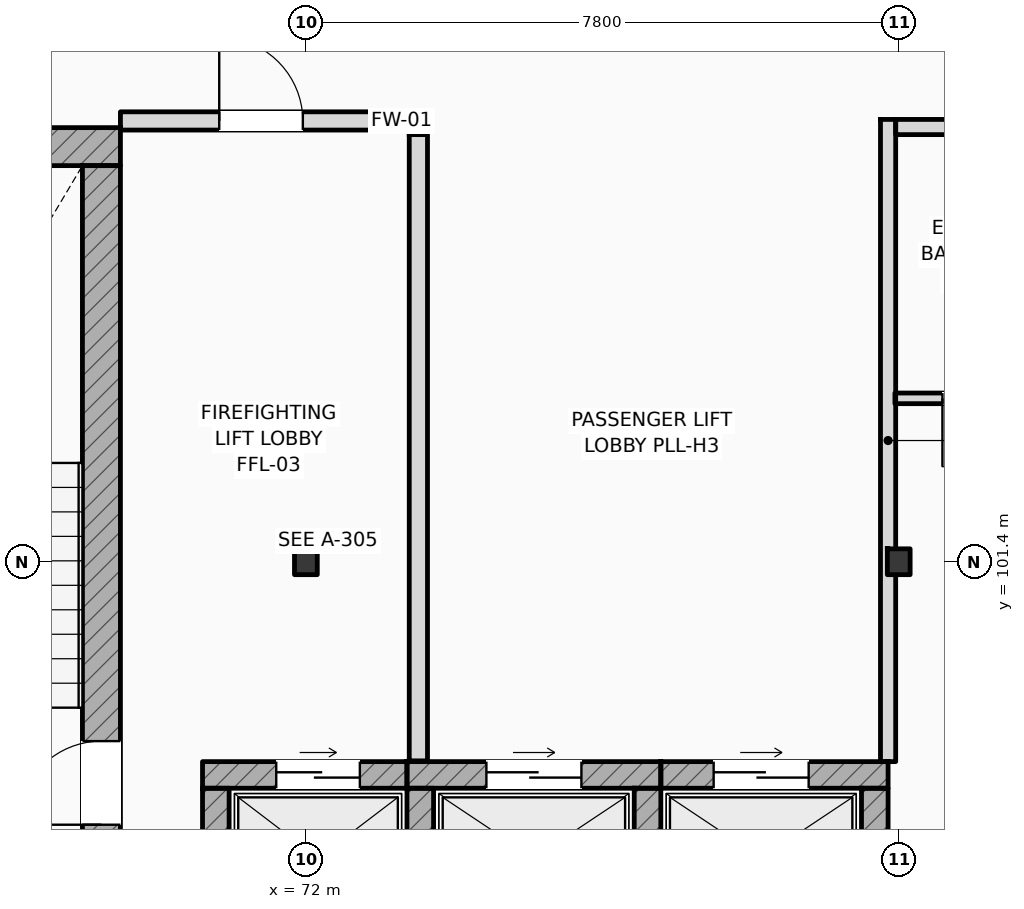
"""IFC4 building model, lengths in metres.
Left out: names, types, materials, properties, quantities, classifications, styles, units other than length and angle.
Written with IfcOpenShell. Run it as: python <this file> out.ifc"""

import sys

from ifc_helpers import new_model, si_unit, direction, frame, frame_2d, origin, origin_2d, place, context, subcontext, project, spatial, rectangle, i_section, extrude, element, fill, save


model = new_model("IFC4")
c1 = context("Model", 3, precision=1e-05, world=origin(), true_north=direction((0.0, 1.0)))
c2 = subcontext(c1, "Body", "Model", "MODEL_VIEW")
j1 = project(units=[si_unit("LENGTHUNIT", "METRE"), si_unit("PLANEANGLEUNIT", "RADIAN")], contexts=[c1])
p1 = place(None, origin())
s1 = spatial("IfcSite", under=j1, at=p1, CompositionType="ELEMENT")
p2 = place(p1, origin())
s2 = spatial("IfcBuilding", under=s1, at=p2, CompositionType="ELEMENT")
p3 = place(p2, frame((0.0, 0.0, 39.0)))
s3 = spatial("IfcBuildingStorey", under=s2, at=p3, CompositionType="ELEMENT", Elevation=39.0)
for number, where, z_axis, x_axis in (
    (1, (72.0, 101.4, 0.0), (0.0, 0.0, 1.0), (1.0, 0.0, 0.0)),
    (2, (79.8, 101.4, 0.0), (0.0, 0.0, 1.0), (1.0, 0.0, 0.0)),
):
    element("IfcColumn", number, at=place(p3, frame(where, z_axis=z_axis, x_axis=x_axis)), inside=s3, PredefinedType="COLUMN", context=c2, shape_type="SweptSolid", body=[
        extrude(i_section(OverallWidth=0.3, OverallDepth=0.34, WebThickness=0.012, FlangeThickness=0.021, FilletRadius=0.027, at=origin_2d()), origin(), (0.0, 0.0, 1.0), 3.6),
    ])
p4 = place(p3, frame((64.4, 106.862, 0.0), z_axis=(0.0, 0.0, 1.0), x_axis=(1.0, 0.0, 0.0)))
e3 = element("IfcWall", 3, at=p4, inside=s3, PredefinedType="SHEAR", context=c2, shape_type="SweptSolid", body=[
    extrude(rectangle(XDim=5.16, YDim=0.5, at=frame_2d((2.58, 0.0))), origin(), (0.0, 0.0, 1.0), 3.6),
])
p5 = place(p3, frame((69.31, 97.5, 0.0), z_axis=(0.0, 0.0, 1.0), x_axis=(0.0, 1.0, 0.0)))
e4 = element("IfcWall", 4, at=p5, inside=s3, PredefinedType="SHEAR", context=c2, shape_type="SweptSolid", body=[
    extrude(rectangle(XDim=9.112, YDim=0.5, at=frame_2d((4.556, 0.0))), origin(), (0.0, 0.0, 1.0), 3.6),
])
p6 = place(p5, frame((0.44, 0.0, 0.0)))
e5 = element("IfcOpeningElement", 5, at=p6, cuts=e4, PredefinedType="OPENING", context=c2, shape_type="SweptSolid", body=[
    extrude(rectangle(XDim=1.1, YDim=2.2, at=frame_2d((0.55, 1.1))), frame((0.0, 0.26, 0.0), z_axis=(0.0, -1.0, 0.0), x_axis=(1.0, 0.0, 0.0)), (0.0, 0.0, 1.0), 0.52),
])
p7 = place(p3, frame((70.64, 98.595, 0.0), z_axis=(0.0, 0.0, 1.0), x_axis=(1.0, 0.0, 0.0)))
e6 = element("IfcWall", 6, at=p7, inside=s3, PredefinedType="SHEAR", context=c2, shape_type="SweptSolid", body=[
    extrude(rectangle(XDim=2.69, YDim=0.35, at=frame_2d((1.345, 0.0))), origin(), (0.0, 0.0, 1.0), 3.38),
])
p8 = place(p7, frame((0.97, 0.0, 0.0)))
e7 = element("IfcOpeningElement", 7, at=p8, cuts=e6, PredefinedType="OPENING", context=c2, shape_type="SweptSolid", body=[
    extrude(rectangle(XDim=1.1, YDim=2.2, at=frame_2d((0.55, 1.1))), frame((0.0, 0.185, 0.0), z_axis=(0.0, -1.0, 0.0), x_axis=(1.0, 0.0, 0.0)), (0.0, 0.0, 1.0), 0.37),
])
p9 = place(p3, frame((70.815, 96.58, 0.0), z_axis=(0.0, 0.0, 1.0), x_axis=(0.0, 1.0, 0.0)))
e8 = element("IfcWall", 8, at=p9, inside=s3, PredefinedType="SHEAR", context=c2, shape_type="SweptSolid", body=[
    extrude(rectangle(XDim=1.84, YDim=0.35, at=frame_2d((0.92, 0.0))), origin(), (0.0, 0.0, 1.0), 3.38),
])
p10 = place(p3, frame((73.33, 98.595, 0.0), z_axis=(0.0, 0.0, 1.0), x_axis=(1.0, 0.0, 0.0)))
e9 = element("IfcWall", 9, at=p10, inside=s3, PredefinedType="SHEAR", context=c2, shape_type="SweptSolid", body=[
    extrude(rectangle(XDim=3.34, YDim=0.35, at=frame_2d((1.67, 0.0))), origin(), (0.0, 0.0, 1.0), 3.38),
])
p11 = place(p10, frame((1.045, 0.0, 0.0)))
e10 = element("IfcOpeningElement", 10, at=p11, cuts=e9, PredefinedType="OPENING", context=c2, shape_type="SweptSolid", body=[
    extrude(rectangle(XDim=1.25, YDim=2.25, at=frame_2d((0.625, 1.125))), frame((0.0, 0.185, 0.0), z_axis=(0.0, -1.0, 0.0), x_axis=(1.0, 0.0, 0.0)), (0.0, 0.0, 1.0), 0.37),
])
for number, where, z_axis, x_axis in (
    (11, (73.505, 96.58, 0.0), (0.0, 0.0, 1.0), (0.0, 1.0, 0.0)),
    (12, (76.495, 96.58, 0.0), (0.0, 0.0, 1.0), (0.0, 1.0, 0.0)),
):
    element("IfcWall", number, at=place(p3, frame(where, z_axis=z_axis, x_axis=x_axis)), inside=s3, PredefinedType="SHEAR", context=c2, shape_type="SweptSolid", body=[
        extrude(rectangle(XDim=1.84, YDim=0.35, at=frame_2d((0.92, 0.0))), origin(), (0.0, 0.0, 1.0), 3.38),
    ])
p12 = place(p3, frame((76.67, 98.595, 0.0), z_axis=(0.0, 0.0, 1.0), x_axis=(1.0, 0.0, 0.0)))
e13 = element("IfcWall", 13, at=p12, inside=s3, PredefinedType="SHEAR", context=c2, shape_type="SweptSolid", body=[
    extrude(rectangle(XDim=2.99, YDim=0.35, at=frame_2d((1.495, 0.0))), origin(), (0.0, 0.0, 1.0), 3.38),
])
p13 = place(p12, frame((0.695, 0.0, 0.0)))
e14 = element("IfcOpeningElement", 14, at=p13, cuts=e13, PredefinedType="OPENING", context=c2, shape_type="SweptSolid", body=[
    extrude(rectangle(XDim=1.25, YDim=2.25, at=frame_2d((0.625, 1.125))), frame((0.0, 0.185, 0.0), z_axis=(0.0, -1.0, 0.0), x_axis=(1.0, 0.0, 0.0)), (0.0, 0.0, 1.0), 0.37),
])
p14 = place(p3, frame((79.485, 96.58, 0.0), z_axis=(0.0, 0.0, 1.0), x_axis=(0.0, 1.0, 0.0)))
e15 = element("IfcWall", 15, at=p14, inside=s3, PredefinedType="SHEAR", context=c2, shape_type="SweptSolid", body=[
    extrude(rectangle(XDim=1.84, YDim=0.35, at=frame_2d((0.92, 0.0))), origin(), (0.0, 0.0, 1.0), 3.01),
])
p15 = place(p3, frame((73.48, 98.78, 0.0), z_axis=(0.0, 0.0, 1.0), x_axis=(0.0, 1.0, 0.0)))
e16 = element("IfcWall", 16, at=p15, inside=s3, PredefinedType="STANDARD", context=c2, shape_type="SweptSolid", body=[
    extrude(rectangle(XDim=8.24, YDim=0.24, at=frame_2d((4.12, 0.0))), origin(), (0.0, 0.0, 1.0), 3.38),
])
p16 = place(p3, frame((69.56, 107.2, 0.0), z_axis=(0.0, 0.0, 1.0), x_axis=(1.0, 0.0, 0.0)))
e17 = element("IfcWall", 17, at=p16, inside=s3, PredefinedType="STANDARD", context=c2, shape_type="SweptSolid", body=[
    extrude(rectangle(XDim=4.1, YDim=0.24, at=frame_2d((2.05, 0.0))), origin(), (0.0, 0.0, 1.0), 3.38),
])
p17 = place(p16, frame((1.3, 0.0, 0.0)))
e18 = element("IfcOpeningElement", 18, at=p17, cuts=e17, PredefinedType="OPENING", context=c2, shape_type="SweptSolid", body=[
    extrude(rectangle(XDim=1.1, YDim=2.2, at=frame_2d((0.55, 1.1))), frame((0.0, 0.13, 0.0), z_axis=(0.0, -1.0, 0.0), x_axis=(1.0, 0.0, 0.0)), (0.0, 0.0, 1.0), 0.26),
])
p18 = place(p3, frame((79.76, 107.12, 0.0), z_axis=(0.0, 0.0, 1.0), x_axis=(1.0, 0.0, 0.0)))
e19 = element("IfcWall", 19, at=p18, inside=s3, PredefinedType="PARTITIONING", context=c2, shape_type="SweptSolid", body=[
    extrude(rectangle(XDim=15.5, YDim=0.2, at=frame_2d((7.75, 0.0))), origin(), (0.0, 0.0, 1.0), 3.38),
])
p19 = place(p18, frame((2.552, 0.0, 0.0)))
e20 = element("IfcOpeningElement", 20, at=p19, cuts=e19, PredefinedType="OPENING", context=c2, shape_type="SweptSolid", body=[
    extrude(rectangle(XDim=0.96, YDim=2.2, at=frame_2d((0.48, 1.1))), frame((0.0, 0.11, 0.0), z_axis=(0.0, -1.0, 0.0), x_axis=(1.0, 0.0, 0.0)), (0.0, 0.0, 1.0), 0.22),
])
p20 = place(p18, frame((4.184, 0.0, 0.0)))
e21 = element("IfcOpeningElement", 21, at=p20, cuts=e19, PredefinedType="OPENING", context=c2, shape_type="SweptSolid", body=[
    extrude(rectangle(XDim=0.96, YDim=2.2, at=frame_2d((0.48, 1.1))), frame((0.0, 0.11, 0.0), z_axis=(0.0, -1.0, 0.0), x_axis=(1.0, 0.0, 0.0)), (0.0, 0.0, 1.0), 0.22),
])
p21 = place(p18, frame((10.146, 0.0, 0.0)))
e22 = element("IfcOpeningElement", 22, at=p21, cuts=e19, PredefinedType="OPENING", context=c2, shape_type="SweptSolid", body=[
    extrude(rectangle(XDim=0.96, YDim=2.2, at=frame_2d((0.48, 1.1))), frame((0.0, 0.11, 0.0), z_axis=(0.0, -1.0, 0.0), x_axis=(1.0, 0.0, 0.0)), (0.0, 0.0, 1.0), 0.22),
])
p22 = place(p18, frame((11.839, 0.0, 0.0)))
e23 = element("IfcOpeningElement", 23, at=p22, cuts=e19, PredefinedType="OPENING", context=c2, shape_type="SweptSolid", body=[
    extrude(rectangle(XDim=0.96, YDim=2.2, at=frame_2d((0.48, 1.1))), frame((0.0, 0.11, 0.0), z_axis=(0.0, -1.0, 0.0), x_axis=(1.0, 0.0, 0.0)), (0.0, 0.0, 1.0), 0.22),
])
p23 = place(p3, frame((79.66, 98.77, 0.0), z_axis=(0.0, 0.0, 1.0), x_axis=(0.0, 1.0, 0.0)))
e24 = element("IfcWall", 24, at=p23, inside=s3, PredefinedType="PARTITIONING", context=c2, shape_type="SweptSolid", body=[
    extrude(rectangle(XDim=8.45, YDim=0.2, at=frame_2d((4.225, 0.0))), origin(), (0.0, 0.0, 1.0), 3.01),
])
p24 = place(p3, frame((79.75, 103.55, 0.0), z_axis=(0.0, 0.0, 1.0), x_axis=(1.0, 0.0, 0.0)))
e25 = element("IfcWall", 25, at=p24, inside=s3, PredefinedType="PARTITIONING", context=c2, shape_type="SweptSolid", body=[
    extrude(rectangle(XDim=2.15, YDim=0.14, at=frame_2d((1.075, 0.0))), origin(), (0.0, 0.0, 1.0), 3.38),
])
p25 = place(p24, frame((0.625, 0.0, 0.0)))
e26 = element("IfcOpeningElement", 26, at=p25, cuts=e25, PredefinedType="OPENING", context=c2, shape_type="SweptSolid", body=[
    extrude(rectangle(XDim=0.9, YDim=2.1, at=frame_2d((0.45, 1.05))), frame((0.0, 0.08, 0.0), z_axis=(0.0, -1.0, 0.0), x_axis=(1.0, 0.0, 0.0)), (0.0, 0.0, 1.0), 0.16),
])
p26 = place(p6, origin())
e27 = element("IfcDoor", 27, at=p26, inside=s3, OperationType="SINGLE_SWING_LEFT", PredefinedType="DOOR", context=c2, shape_type="SweptSolid", body=[
    extrude(rectangle(XDim=1.1, YDim=2.2, at=frame_2d((0.55, 1.1))), frame((0.0, 0.025, 0.0), z_axis=(0.0, -1.0, 0.0), x_axis=(1.0, 0.0, 0.0)), (0.0, 0.0, 1.0), 0.05),
])
fill(e5, e27)
p27 = place(p8, origin())
e28 = element("IfcDoor", 28, at=p27, inside=s3, OperationType="SLIDING_TO_LEFT", PredefinedType="DOOR", context=c2, shape_type="SweptSolid", body=[
    extrude(rectangle(XDim=1.1, YDim=2.2, at=frame_2d((0.55, 1.1))), frame((0.0, 0.025, 0.0), z_axis=(0.0, -1.0, 0.0), x_axis=(1.0, 0.0, 0.0)), (0.0, 0.0, 1.0), 0.05),
])
fill(e7, e28)
p28 = place(p11, origin())
e29 = element("IfcDoor", 29, at=p28, inside=s3, OperationType="SLIDING_TO_LEFT", PredefinedType="DOOR", context=c2, shape_type="SweptSolid", body=[
    extrude(rectangle(XDim=1.25, YDim=2.25, at=frame_2d((0.625, 1.125))), frame((0.0, 0.025, 0.0), z_axis=(0.0, -1.0, 0.0), x_axis=(1.0, 0.0, 0.0)), (0.0, 0.0, 1.0), 0.05),
])
fill(e10, e29)
p29 = place(p13, origin())
e30 = element("IfcDoor", 30, at=p29, inside=s3, OperationType="SLIDING_TO_LEFT", PredefinedType="DOOR", context=c2, shape_type="SweptSolid", body=[
    extrude(rectangle(XDim=1.25, YDim=2.25, at=frame_2d((0.625, 1.125))), frame((0.0, 0.025, 0.0), z_axis=(0.0, -1.0, 0.0), x_axis=(1.0, 0.0, 0.0)), (0.0, 0.0, 1.0), 0.05),
])
fill(e14, e30)
p30 = place(p17, origin())
e31 = element("IfcDoor", 31, at=p30, inside=s3, OperationType="SINGLE_SWING_LEFT", PredefinedType="DOOR", context=c2, shape_type="SweptSolid", body=[
    extrude(rectangle(XDim=1.1, YDim=2.2, at=frame_2d((0.55, 1.1))), frame((0.0, 0.025, 0.0), z_axis=(0.0, -1.0, 0.0), x_axis=(1.0, 0.0, 0.0)), (0.0, 0.0, 1.0), 0.05),
])
fill(e18, e31)
p31 = place(p25, frame((0.9, 0.0, 0.0), z_axis=(0.0, 0.0, 1.0), x_axis=(-1.0, 0.0, 0.0)))
e32 = element("IfcDoor", 32, at=p31, inside=s3, OperationType="SINGLE_SWING_LEFT", PredefinedType="DOOR", context=c2, shape_type="SweptSolid", body=[
    extrude(rectangle(XDim=0.9, YDim=2.1, at=frame_2d((0.45, 1.05))), frame((0.0, 0.025, 0.0), z_axis=(0.0, -1.0, 0.0), x_axis=(1.0, 0.0, 0.0)), (0.0, 0.0, 1.0), 0.05),
])
fill(e26, e32)
save(model, sys.argv[1])
